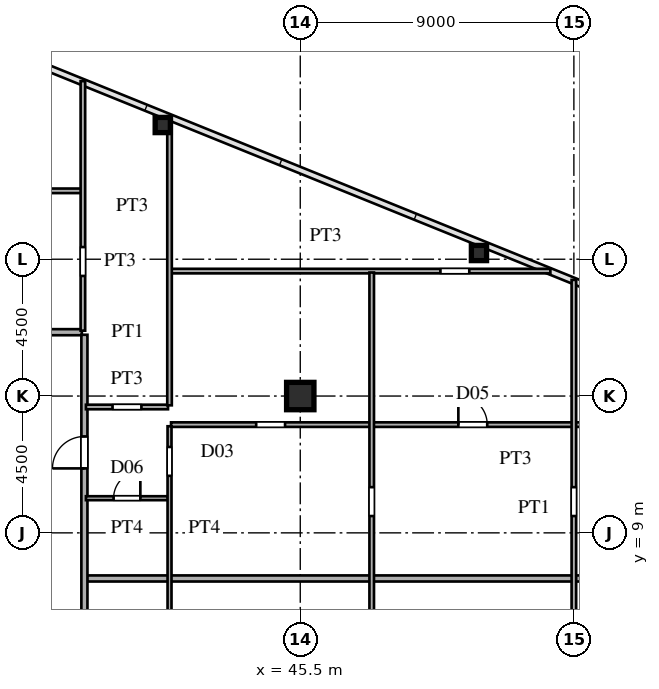
"""IFC4 building model, lengths in metres.
Left out: names, types, materials, properties, quantities, classifications, styles, units other than length and angle.
Written with IfcOpenShell. Run it as: python <this file> out.ifc"""

import sys

from ifc_helpers import new_model, si_unit, direction, frame, frame_2d, origin, origin_2d, place, context, subcontext, project, spatial, rectangle, hollow_rectangle, i_section, extrude, source, transform, mapped, element, fill, save


model = new_model("IFC4")
c1 = context("Model", 3, precision=1e-05, world=origin(), true_north=direction((0.0, 1.0)))
c2 = subcontext(c1, "Body", "Model", "MODEL_VIEW")
j1 = project(units=[si_unit("LENGTHUNIT", "METRE"), si_unit("PLANEANGLEUNIT", "RADIAN")], contexts=[c1])
p1 = place(None, origin())
s1 = spatial("IfcSite", under=j1, at=p1, CompositionType="ELEMENT")
p2 = place(p1, origin())
s2 = spatial("IfcBuilding", under=s1, at=p2, CompositionType="ELEMENT")
p3 = place(p2, frame((0.0, 0.0, 26.1)))
s3 = spatial("IfcBuildingStorey", under=s2, at=p3, CompositionType="ELEMENT", Elevation=26.1)
m1 = source(origin(), c2, "Body", "SweptSolid", [
    extrude(i_section(OverallWidth=0.9, OverallDepth=0.9, WebThickness=0.036, FlangeThickness=0.055, at=origin_2d()), origin(), (0.0, 0.0, 1.0), 3.6),
])
p4 = place(p3, frame((45.5, 13.5, 0.0), z_axis=(0.0, 0.0, 1.0), x_axis=(1.0, 0.0, 0.0)))
e1 = element("IfcColumn", 1, at=p4, inside=s3, PredefinedType="COLUMN", context=c2, shape_type="MappedRepresentation", body=[
    mapped(m1, transform((0.0, 0.0, 0.0), scale=1.0)),
])
m2 = source(origin(), c2, "Body", "SweptSolid", [
    extrude(hollow_rectangle(XDim=0.5, YDim=0.5, WallThickness=0.02, at=origin_2d()), origin(), (0.0, 0.0, 1.0), 3.6),
])
for number, where, z_axis, x_axis in (
    (2, (40.977, 22.414, 0.0), (0.0, 0.0, 1.0), (1.0, 0.0, 0.0)),
    (3, (51.378, 18.204, 0.0), (0.0, 0.0, 1.0), (1.0, 0.0, 0.0)),
):
    element("IfcColumn", number, at=place(p3, frame(where, z_axis=z_axis, x_axis=x_axis)), inside=s3, PredefinedType="COLUMN", context=c2, shape_type="MappedRepresentation", body=[
        mapped(m2, transform((0.0, 0.0, 0.0), scale=1.0)),
    ])
p5 = place(p3, frame((38.48, 7.5, 0.0), z_axis=(0.0, 0.0, 1.0), x_axis=(1.0, 0.0, 0.0)))
e4 = element("IfcWall", 4, at=p5, inside=s3, PredefinedType="PARTITIONING", context=c2, shape_type="SweptSolid", body=[
    extrude(rectangle(XDim=34.025, YDim=0.2, at=frame_2d((17.012, 0.0))), origin(), (0.0, 0.0, 1.0), 3.38),
])
p6 = place(p3, frame((38.45, 10.14, 0.0), z_axis=(0.0, 0.0, 1.0), x_axis=(1.0, 0.0, 0.0)))
e5 = element("IfcWall", 5, at=p6, inside=s3, PredefinedType="PARTITIONING", context=c2, shape_type="SweptSolid", body=[
    extrude(rectangle(XDim=2.7, YDim=0.13, at=frame_2d((1.35, 0.0))), origin(), (0.0, 0.0, 1.0), 3.38),
])
p7 = place(p6, frame((0.91, 0.0, 0.0)))
e6 = element("IfcOpeningElement", 6, at=p7, cuts=e5, PredefinedType="OPENING", context=c2, shape_type="SweptSolid", body=[
    extrude(rectangle(XDim=0.88, YDim=2.1, at=frame_2d((0.44, 1.05))), frame((0.0, 0.075, 0.0), z_axis=(0.0, -1.0, 0.0), x_axis=(1.0, 0.0, 0.0)), (0.0, 0.0, 1.0), 0.15),
])
p8 = place(p3, frame((41.25, 12.56, 0.0), z_axis=(0.0, 0.0, 1.0), x_axis=(1.0, 0.0, 0.0)))
e7 = element("IfcWall", 7, at=p8, inside=s3, PredefinedType="PARTITIONING", context=c2, shape_type="SweptSolid", body=[
    extrude(rectangle(XDim=24.969, YDim=0.15, at=frame_2d((12.484, 0.0))), origin(), (0.0, 0.0, 1.0), 3.38),
])
p9 = place(p8, frame((2.8, 0.0, 0.0)))
e8 = element("IfcOpeningElement", 8, at=p9, cuts=e7, PredefinedType="OPENING", context=c2, shape_type="SweptSolid", body=[
    extrude(rectangle(XDim=0.95, YDim=2.15, at=frame_2d((0.475, 1.075))), frame((0.0, 0.085, 0.0), z_axis=(0.0, -1.0, 0.0), x_axis=(1.0, 0.0, 0.0)), (0.0, 0.0, 1.0), 0.17),
])
p10 = place(p8, frame((15.625, 0.0, 0.0)))
e9 = element("IfcOpeningElement", 9, at=p10, cuts=e7, PredefinedType="OPENING", context=c2, shape_type="SweptSolid", body=[
    extrude(rectangle(XDim=0.95, YDim=2.15, at=frame_2d((0.475, 1.075))), frame((0.0, 0.085, 0.0), z_axis=(0.0, -1.0, 0.0), x_axis=(1.0, 0.0, 0.0)), (0.0, 0.0, 1.0), 0.17),
])
p11 = place(p8, frame((9.45, 0.0, 0.0)))
e10 = element("IfcOpeningElement", 10, at=p11, cuts=e7, PredefinedType="OPENING", context=c2, shape_type="SweptSolid", body=[
    extrude(rectangle(XDim=0.95, YDim=2.15, at=frame_2d((0.475, 1.075))), frame((0.0, 0.085, 0.0), z_axis=(0.0, -1.0, 0.0), x_axis=(1.0, 0.0, 0.0)), (0.0, 0.0, 1.0), 0.17),
])
p12 = place(p3, frame((38.45, 13.14, 0.0), z_axis=(0.0, 0.0, 1.0), x_axis=(1.0, 0.0, 0.0)))
e11 = element("IfcWall", 11, at=p12, inside=s3, PredefinedType="PARTITIONING", context=c2, shape_type="SweptSolid", body=[
    extrude(rectangle(XDim=2.7, YDim=0.15, at=frame_2d((1.35, 0.0))), origin(), (0.0, 0.0, 1.0), 3.38),
])
p13 = place(p12, frame((0.875, 0.0, 0.0)))
e12 = element("IfcOpeningElement", 12, at=p13, cuts=e11, PredefinedType="OPENING", context=c2, shape_type="SweptSolid", body=[
    extrude(rectangle(XDim=0.95, YDim=2.15, at=frame_2d((0.475, 1.075))), frame((0.0, 0.085, 0.0), z_axis=(0.0, -1.0, 0.0), x_axis=(1.0, 0.0, 0.0)), (0.0, 0.0, 1.0), 0.17),
])
p14 = place(p3, frame((36.585, 15.6, 0.0), z_axis=(0.0, 0.0, 1.0), x_axis=(1.0, 0.0, 0.0)))
e13 = element("IfcWall", 13, at=p14, inside=s3, PredefinedType="PARTITIONING", context=c2, shape_type="SweptSolid", body=[
    extrude(rectangle(XDim=1.73, YDim=0.2, at=frame_2d((0.865, 0.0))), origin(), (0.0, 0.0, 1.0), 3.38),
])
p15 = place(p3, frame((41.25, 17.61, 0.0), z_axis=(0.0, 0.0, 1.0), x_axis=(1.0, 0.0, 0.0)))
e14 = element("IfcWall", 14, at=p15, inside=s3, PredefinedType="PARTITIONING", context=c2, shape_type="SweptSolid", body=[
    extrude(rectangle(XDim=12.477, YDim=0.15, at=frame_2d((6.239, 0.0))), origin(), (0.0, 0.0, 1.0), 3.38),
])
p16 = place(p15, frame((8.86, 0.0, 0.0)))
e15 = element("IfcOpeningElement", 15, at=p16, cuts=e14, PredefinedType="OPENING", context=c2, shape_type="SweptSolid", body=[
    extrude(rectangle(XDim=0.95, YDim=2.15, at=frame_2d((0.475, 1.075))), frame((0.0, 0.085, 0.0), z_axis=(0.0, -1.0, 0.0), x_axis=(1.0, 0.0, 0.0)), (0.0, 0.0, 1.0), 0.17),
])
p17 = place(p3, frame((27.465, 20.25, 0.0), z_axis=(0.0, 0.0, 1.0), x_axis=(1.0, 0.0, 0.0)))
e16 = element("IfcWall", 16, at=p17, inside=s3, PredefinedType="PARTITIONING", context=c2, shape_type="SweptSolid", body=[
    extrude(rectangle(XDim=10.835, YDim=0.15, at=frame_2d((5.417, 0.0))), origin(), (0.0, 0.0, 1.0), 3.38),
])
p18 = place(p17, frame((4.985, 0.0, 0.0)))
e17 = element("IfcOpeningElement", 17, at=p18, cuts=e16, PredefinedType="OPENING", context=c2, shape_type="SweptSolid", body=[
    extrude(rectangle(XDim=0.95, YDim=2.15, at=frame_2d((0.475, 1.075))), frame((0.0, 0.085, 0.0), z_axis=(0.0, -1.0, 0.0), x_axis=(1.0, 0.0, 0.0)), (0.0, 0.0, 1.0), 0.17),
])
p19 = place(p3, frame((38.35, 15.65, 0.0), z_axis=(0.0, 0.0, 1.0), x_axis=(0.0, 1.0, 0.0)))
e18 = element("IfcWall", 18, at=p19, inside=s3, PredefinedType="PARTITIONING", context=c2, shape_type="SweptSolid", body=[
    extrude(rectangle(XDim=8.208, YDim=0.15, at=frame_2d((4.104, 0.0))), origin(), (0.0, 0.0, 1.0), 3.38),
])
p20 = place(p19, frame((1.8, 0.0, 0.0)))
e19 = element("IfcOpeningElement", 19, at=p20, cuts=e18, PredefinedType="OPENING", context=c2, shape_type="SweptSolid", body=[
    extrude(rectangle(XDim=0.95, YDim=2.15, at=frame_2d((0.475, 1.075))), frame((0.0, 0.085, 0.0), z_axis=(0.0, -1.0, 0.0), x_axis=(1.0, 0.0, 0.0)), (0.0, 0.0, 1.0), 0.17),
])
p21 = place(p3, frame((38.4, -15.515, 0.0), z_axis=(0.0, 0.0, 1.0), x_axis=(0.0, 1.0, 0.0)))
e20 = element("IfcWall", 20, at=p21, inside=s3, PredefinedType="PARTITIONING", context=c2, shape_type="SweptSolid", body=[
    extrude(rectangle(XDim=31.03, YDim=0.2, at=frame_2d((15.515, 0.0))), origin(), (0.0, 0.0, 1.0), 3.38),
])
p22 = place(p21, frame((4.163, 0.0, 0.0)))
e21 = element("IfcOpeningElement", 21, at=p22, cuts=e20, PredefinedType="OPENING", context=c2, shape_type="SweptSolid", body=[
    extrude(rectangle(XDim=1.05, YDim=2.25, at=frame_2d((0.525, 1.125))), frame((0.0, 0.11, 0.0), z_axis=(0.0, -1.0, 0.0), x_axis=(1.0, 0.0, 0.0)), (0.0, 0.0, 1.0), 0.22),
])
p23 = place(p21, frame((15.538, 0.0, 0.0)))
e22 = element("IfcOpeningElement", 22, at=p23, cuts=e20, PredefinedType="OPENING", context=c2, shape_type="SweptSolid", body=[
    extrude(rectangle(XDim=1.05, YDim=2.25, at=frame_2d((0.525, 1.125))), frame((0.0, 0.11, 0.0), z_axis=(0.0, -1.0, 0.0), x_axis=(1.0, 0.0, 0.0)), (0.0, 0.0, 1.0), 0.22),
])
p24 = place(p21, frame((26.635, 0.0, 0.0)))
e23 = element("IfcOpeningElement", 23, at=p24, cuts=e20, PredefinedType="OPENING", context=c2, shape_type="SweptSolid", body=[
    extrude(rectangle(XDim=1.05, YDim=2.25, at=frame_2d((0.525, 1.125))), frame((0.0, 0.11, 0.0), z_axis=(0.0, -1.0, 0.0), x_axis=(1.0, 0.0, 0.0)), (0.0, 0.0, 1.0), 0.22),
])
p25 = place(p3, frame((41.2, 3.502, 0.0), z_axis=(0.0, 0.0, 1.0), x_axis=(0.0, 1.0, 0.0)))
e24 = element("IfcWall", 24, at=p25, inside=s3, PredefinedType="PARTITIONING", context=c2, shape_type="SweptSolid", body=[
    extrude(rectangle(XDim=9.004, YDim=0.13, at=frame_2d((4.502, 0.0))), origin(), (0.0, 0.0, 1.0), 3.38),
])
p26 = place(p25, frame((7.374, 0.0, 0.0)))
e25 = element("IfcOpeningElement", 25, at=p26, cuts=e24, PredefinedType="OPENING", context=c2, shape_type="SweptSolid", body=[
    extrude(rectangle(XDim=0.95, YDim=2.15, at=frame_2d((0.475, 1.075))), frame((0.0, 0.075, 0.0), z_axis=(0.0, -1.0, 0.0), x_axis=(1.0, 0.0, 0.0)), (0.0, 0.0, 1.0), 0.15),
])
p27 = place(p3, frame((41.2, 13.195, 0.0), z_axis=(0.0, 0.0, 1.0), x_axis=(0.0, 1.0, 0.0)))
e26 = element("IfcWall", 26, at=p27, inside=s3, PredefinedType="PARTITIONING", context=c2, shape_type="SweptSolid", body=[
    extrude(rectangle(XDim=9.509, YDim=0.15, at=frame_2d((4.754, 0.0))), origin(), (0.0, 0.0, 1.0), 3.38),
])
p28 = place(p3, frame((47.85, -17.063, 0.0), z_axis=(0.0, 0.0, 1.0), x_axis=(0.0, 1.0, 0.0)))
e27 = element("IfcWall", 27, at=p28, inside=s3, PredefinedType="PARTITIONING", context=c2, shape_type="SweptSolid", body=[
    extrude(rectangle(XDim=34.626, YDim=0.15, at=frame_2d((17.313, 0.0))), origin(), (0.0, 0.0, 1.0), 3.38),
])
p29 = place(p28, frame((7.81, 0.0, 0.0)))
e28 = element("IfcOpeningElement", 28, at=p29, cuts=e27, PredefinedType="OPENING", context=c2, shape_type="SweptSolid", body=[
    extrude(rectangle(XDim=0.95, YDim=2.15, at=frame_2d((0.475, 1.075))), frame((0.0, 0.085, 0.0), z_axis=(0.0, -1.0, 0.0), x_axis=(1.0, 0.0, 0.0)), (0.0, 0.0, 1.0), 0.17),
])
p30 = place(p28, frame((2.253, 0.0, 0.0)))
e29 = element("IfcOpeningElement", 29, at=p30, cuts=e27, PredefinedType="OPENING", context=c2, shape_type="SweptSolid", body=[
    extrude(rectangle(XDim=0.95, YDim=2.15, at=frame_2d((0.475, 1.075))), frame((0.0, 0.085, 0.0), z_axis=(0.0, -1.0, 0.0), x_axis=(1.0, 0.0, 0.0)), (0.0, 0.0, 1.0), 0.17),
])
p31 = place(p28, frame((17.338, 0.0, 0.0)))
e30 = element("IfcOpeningElement", 30, at=p31, cuts=e27, PredefinedType="OPENING", context=c2, shape_type="SweptSolid", body=[
    extrude(rectangle(XDim=0.95, YDim=2.15, at=frame_2d((0.475, 1.075))), frame((0.0, 0.085, 0.0), z_axis=(0.0, -1.0, 0.0), x_axis=(1.0, 0.0, 0.0)), (0.0, 0.0, 1.0), 0.17),
])
p32 = place(p28, frame((26.616, 0.0, 0.0)))
e31 = element("IfcOpeningElement", 31, at=p32, cuts=e27, PredefinedType="OPENING", context=c2, shape_type="SweptSolid", body=[
    extrude(rectangle(XDim=0.95, YDim=2.15, at=frame_2d((0.475, 1.075))), frame((0.0, 0.085, 0.0), z_axis=(0.0, -1.0, 0.0), x_axis=(1.0, 0.0, 0.0)), (0.0, 0.0, 1.0), 0.17),
])
p33 = place(p3, frame((54.5, -17.063, 0.0), z_axis=(0.0, 0.0, 1.0), x_axis=(0.0, 1.0, 0.0)))
e32 = element("IfcWall", 32, at=p33, inside=s3, PredefinedType="PARTITIONING", context=c2, shape_type="SweptSolid", body=[
    extrude(rectangle(XDim=34.384, YDim=0.15, at=frame_2d((17.192, 0.0))), origin(), (0.0, 0.0, 1.0), 2.68),
])
p34 = place(p33, frame((7.81, 0.0, 0.0)))
e33 = element("IfcOpeningElement", 33, at=p34, cuts=e32, PredefinedType="OPENING", context=c2, shape_type="SweptSolid", body=[
    extrude(rectangle(XDim=0.95, YDim=2.15, at=frame_2d((0.475, 1.075))), frame((0.0, 0.085, 0.0), z_axis=(0.0, -1.0, 0.0), x_axis=(1.0, 0.0, 0.0)), (0.0, 0.0, 1.0), 0.17),
])
p35 = place(p33, frame((17.338, 0.0, 0.0)))
e34 = element("IfcOpeningElement", 34, at=p35, cuts=e32, PredefinedType="OPENING", context=c2, shape_type="SweptSolid", body=[
    extrude(rectangle(XDim=0.95, YDim=2.15, at=frame_2d((0.475, 1.075))), frame((0.0, 0.085, 0.0), z_axis=(0.0, -1.0, 0.0), x_axis=(1.0, 0.0, 0.0)), (0.0, 0.0, 1.0), 0.17),
])
p36 = place(p33, frame((13.131, 0.0, 0.0)))
e35 = element("IfcOpeningElement", 35, at=p36, cuts=e32, PredefinedType="OPENING", context=c2, shape_type="SweptSolid", body=[
    extrude(rectangle(XDim=0.95, YDim=2.15, at=frame_2d((0.475, 1.075))), frame((0.0, 0.085, 0.0), z_axis=(0.0, -1.0, 0.0), x_axis=(1.0, 0.0, 0.0)), (0.0, 0.0, 1.0), 0.17),
])
p37 = place(p33, frame((22.131, 0.0, 0.0)))
e36 = element("IfcOpeningElement", 36, at=p37, cuts=e32, PredefinedType="OPENING", context=c2, shape_type="SweptSolid", body=[
    extrude(rectangle(XDim=0.95, YDim=2.15, at=frame_2d((0.475, 1.075))), frame((0.0, 0.085, 0.0), z_axis=(0.0, -1.0, 0.0), x_axis=(1.0, 0.0, 0.0)), (0.0, 0.0, 1.0), 0.17),
])
p38 = place(p33, frame((26.616, 0.0, 0.0)))
e37 = element("IfcOpeningElement", 37, at=p38, cuts=e32, PredefinedType="OPENING", context=c2, shape_type="SweptSolid", body=[
    extrude(rectangle(XDim=0.95, YDim=2.15, at=frame_2d((0.475, 1.075))), frame((0.0, 0.085, 0.0), z_axis=(0.0, -1.0, 0.0), x_axis=(1.0, 0.0, 0.0)), (0.0, 0.0, 1.0), 0.17),
])
m3 = source(origin(), c2, "Body", "SweptSolid", [
    extrude(rectangle(XDim=0.88, YDim=2.1, at=frame_2d((0.44, 1.05))), frame((0.0, 0.025, 0.0), z_axis=(0.0, -1.0, 0.0), x_axis=(1.0, 0.0, 0.0)), (0.0, 0.0, 1.0), 0.05),
])
p39 = place(p7, origin())
e38 = element("IfcDoor", 38, at=p39, inside=s3, OperationType="SINGLE_SWING_RIGHT", PredefinedType="DOOR", context=c2, shape_type="MappedRepresentation", body=[
    mapped(m3, transform((0.0, 0.0, 0.0), scale=1.0)),
])
fill(e6, e38)
m4 = source(origin(), c2, "Body", "SweptSolid", [
    extrude(rectangle(XDim=0.95, YDim=2.15, at=frame_2d((0.475, 1.075))), frame((0.0, 0.025, 0.0), z_axis=(0.0, -1.0, 0.0), x_axis=(1.0, 0.0, 0.0)), (0.0, 0.0, 1.0), 0.05),
])
p40 = place(p11, origin())
e39 = element("IfcDoor", 39, at=p40, inside=s3, OperationType="SINGLE_SWING_LEFT", PredefinedType="DOOR", context=c2, shape_type="MappedRepresentation", body=[
    mapped(m4, transform((0.0, 0.0, 0.0), scale=1.0)),
])
fill(e10, e39)
m5 = source(origin(), c2, "Body", "SweptSolid", [
    extrude(rectangle(XDim=1.05, YDim=2.25, at=frame_2d((0.525, 1.125))), frame((0.0, 0.025, 0.0), z_axis=(0.0, -1.0, 0.0), x_axis=(1.0, 0.0, 0.0)), (0.0, 0.0, 1.0), 0.05),
])
p41 = place(p24, origin())
e40 = element("IfcDoor", 40, at=p41, inside=s3, OperationType="SINGLE_SWING_LEFT", PredefinedType="DOOR", context=c2, shape_type="MappedRepresentation", body=[
    mapped(m5, transform((0.0, 0.0, 0.0), scale=1.0)),
])
fill(e23, e40)
save(model, sys.argv[1])
